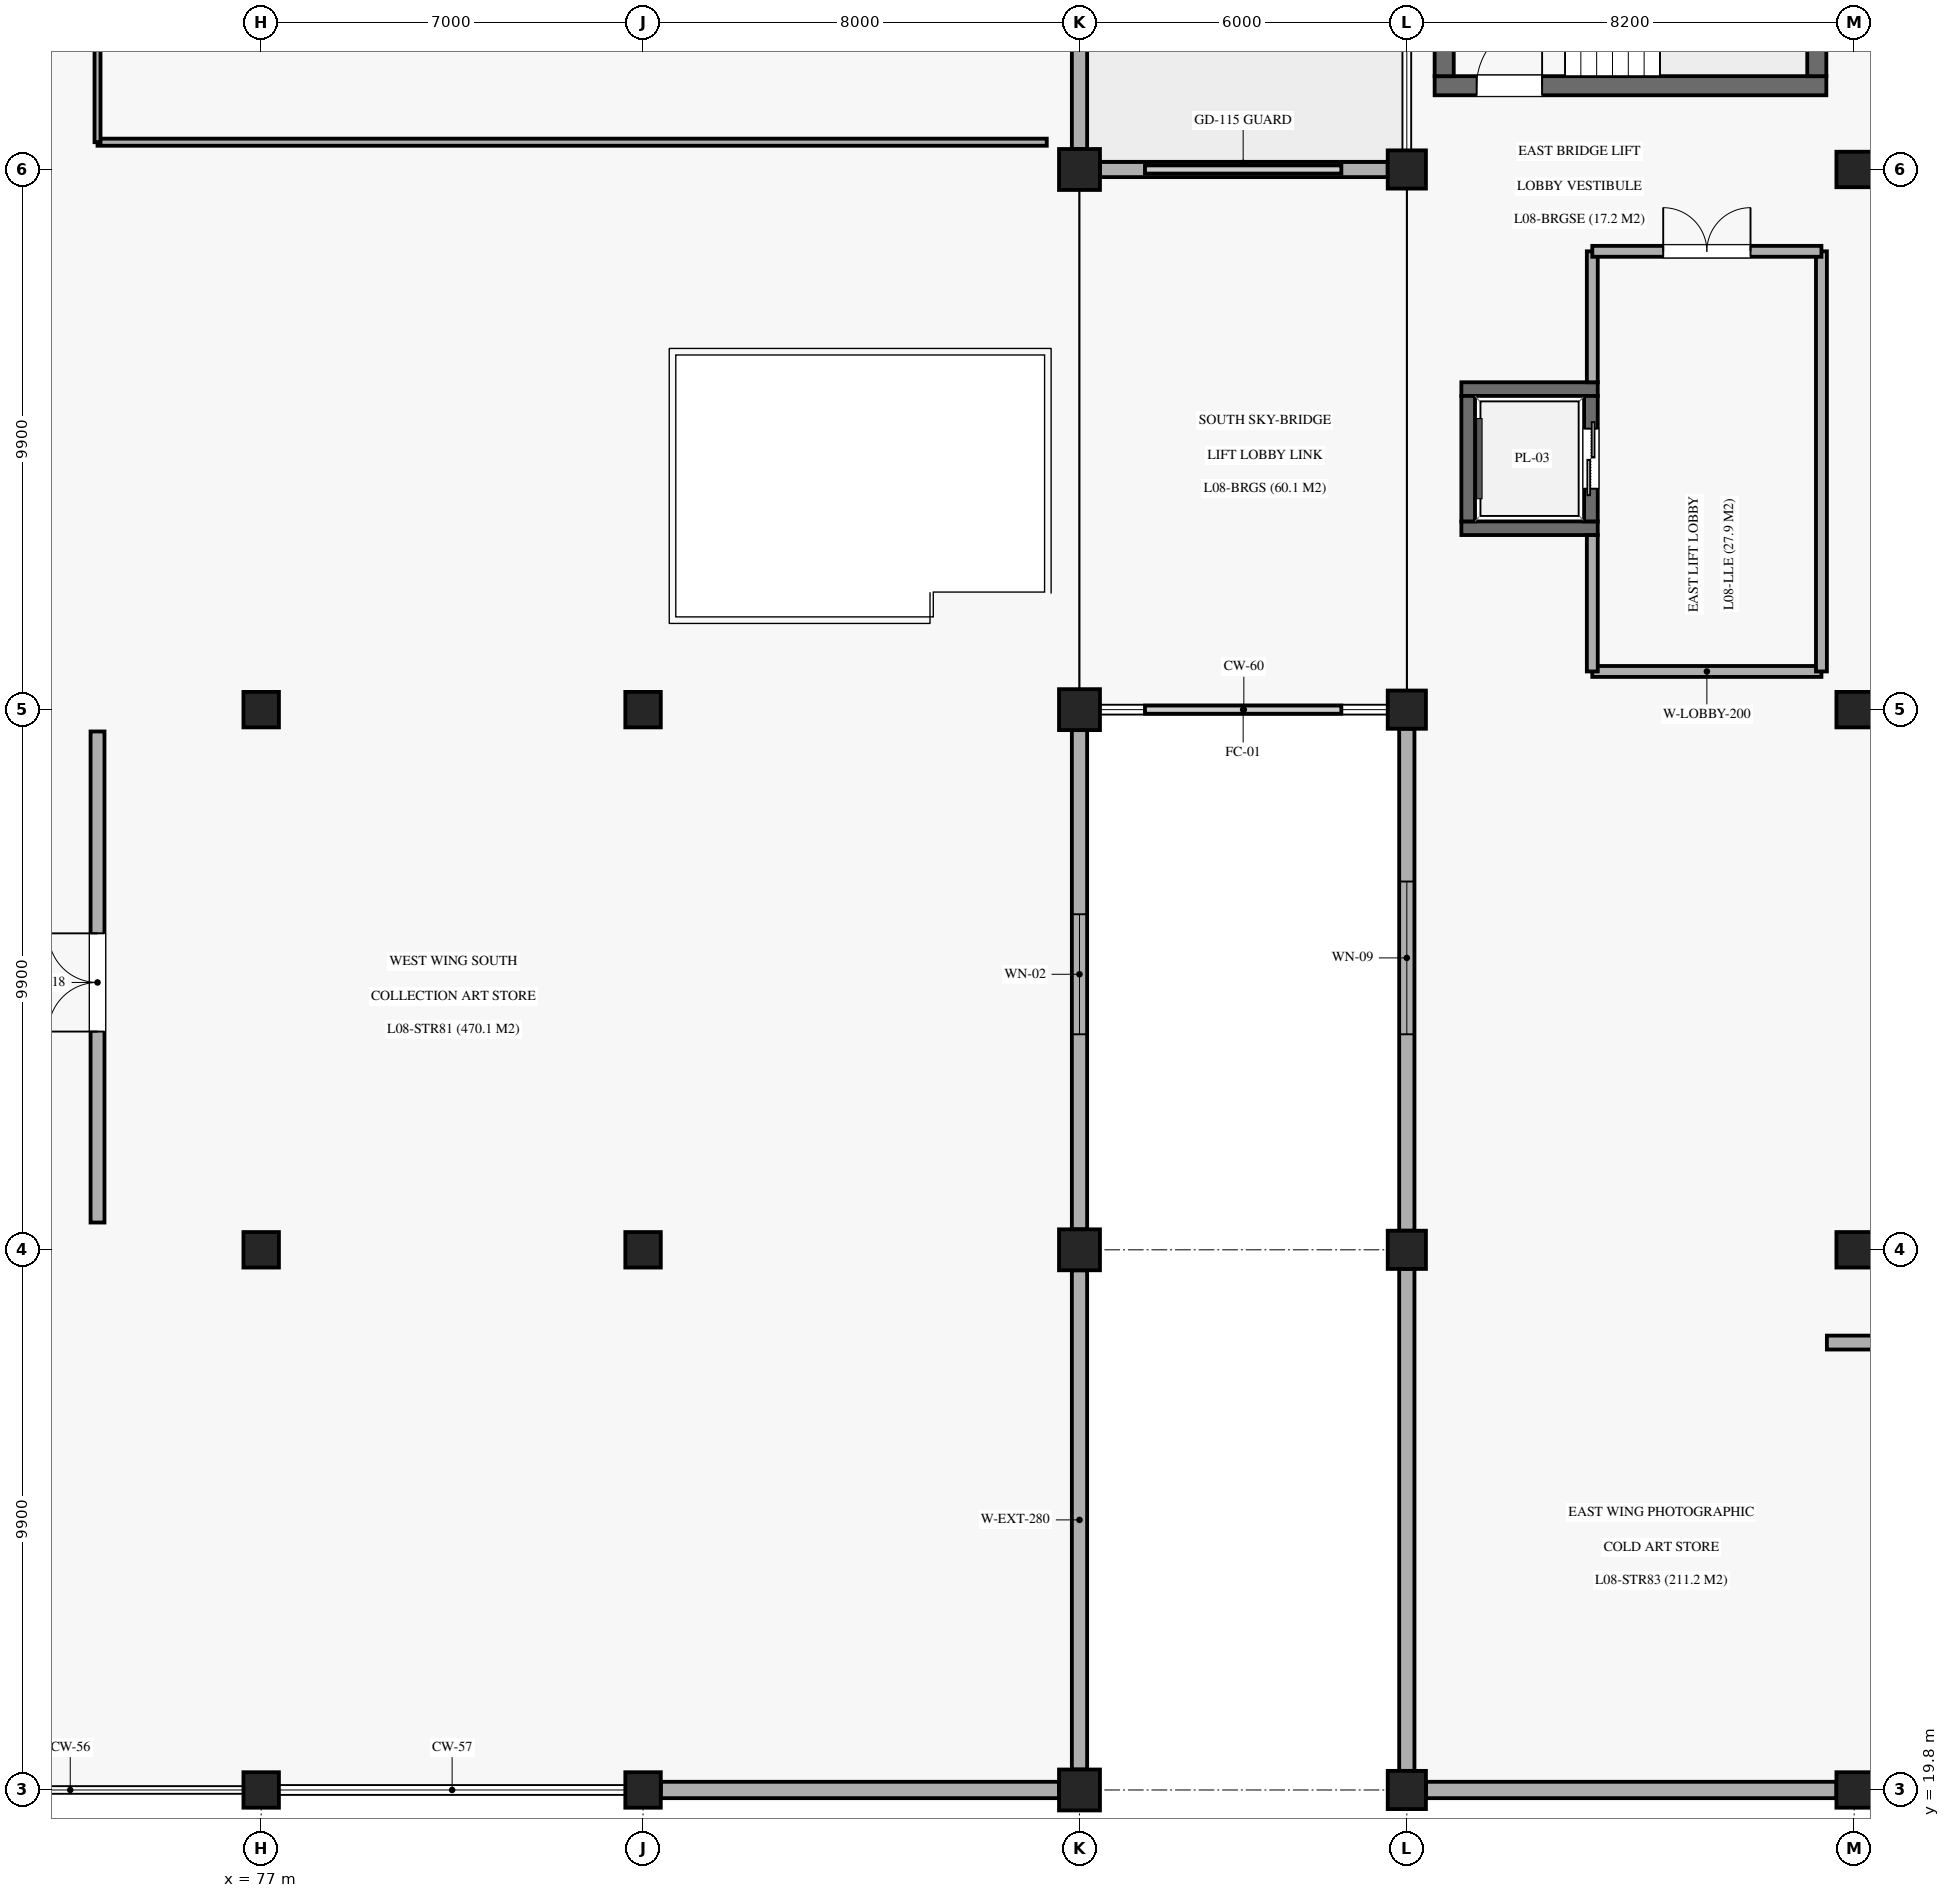
"""IFC4 building model, lengths in metres.
Left out: names, types, materials, properties, quantities, classifications, styles, units other than length and angle.
Written with IfcOpenShell. Run it as: python <this file> out.ifc"""

import sys

from ifc_helpers import new_model, si_unit, direction, frame, frame_2d, origin, origin_2d, place, context, subcontext, project, spatial, rectangle, extrude, element, fill, save


model = new_model("IFC4")
c1 = context("Model", 3, precision=1e-05, world=origin(), true_north=direction((0.0, 1.0)))
c2 = subcontext(c1, "Body", "Model", "MODEL_VIEW")
j1 = project(units=[si_unit("LENGTHUNIT", "METRE"), si_unit("PLANEANGLEUNIT", "RADIAN")], contexts=[c1])
p1 = place(None, origin())
s1 = spatial("IfcSite", under=j1, at=p1, CompositionType="ELEMENT")
p2 = place(p1, origin())
s2 = spatial("IfcBuilding", under=s1, at=p2, CompositionType="ELEMENT")
p3 = place(p2, frame((0.0, 0.0, 42.33)))
s3 = spatial("IfcBuildingStorey", under=s2, at=p3, CompositionType="ELEMENT", Elevation=42.33)
for number, where, z_axis, x_axis in (
    (1, (77.0, 19.8, 0.0), (0.0, 0.0, 1.0), (1.0, 0.0, 0.0)),
    (2, (77.0, 29.7, 0.0), (0.0, 0.0, 1.0), (1.0, 0.0, 0.0)),
    (3, (77.0, 39.6, 0.0), (0.0, 0.0, 1.0), (1.0, 0.0, 0.0)),
    (4, (84.0, 19.8, 0.0), (0.0, 0.0, 1.0), (1.0, 0.0, 0.0)),
    (5, (84.0, 29.7, 0.0), (0.0, 0.0, 1.0), (1.0, 0.0, 0.0)),
    (6, (84.0, 39.6, 0.0), (0.0, 0.0, 1.0), (1.0, 0.0, 0.0)),
):
    element("IfcColumn", number, at=place(p3, frame(where, z_axis=z_axis, x_axis=x_axis)), inside=s3, PredefinedType="COLUMN", context=c2, shape_type="SweptSolid", body=[
        extrude(rectangle(XDim=0.65, YDim=0.65, at=origin_2d()), origin(), (0.0, 0.0, 1.0), 4.59),
    ])
for number, where, z_axis, x_axis in (
    (7, (92.0, 19.8, 0.0), (0.0, 0.0, 1.0), (1.0, 0.0, 0.0)),
    (8, (92.0, 29.7, 0.0), (0.0, 0.0, 1.0), (1.0, 0.0, 0.0)),
    (9, (92.0, 39.6, 0.0), (0.0, 0.0, 1.0), (1.0, 0.0, 0.0)),
    (10, (92.0, 49.5, 0.0), (0.0, 0.0, 1.0), (1.0, 0.0, 0.0)),
):
    element("IfcColumn", number, at=place(p3, frame(where, z_axis=z_axis, x_axis=x_axis)), inside=s3, PredefinedType="COLUMN", context=c2, shape_type="SweptSolid", body=[
        extrude(rectangle(XDim=0.75, YDim=0.75, at=origin_2d()), origin(), (0.0, 0.0, 1.0), 4.59),
    ])
for number, where, z_axis, x_axis in (
    (11, (98.0, 19.8, 0.0), (0.0, 0.0, 1.0), (1.0, 0.0, 0.0)),
    (12, (98.0, 29.7, 0.0), (0.0, 0.0, 1.0), (1.0, 0.0, 0.0)),
    (13, (98.0, 39.6, 0.0), (0.0, 0.0, 1.0), (1.0, 0.0, 0.0)),
    (14, (98.0, 49.5, 0.0), (0.0, 0.0, 1.0), (1.0, 0.0, 0.0)),
):
    element("IfcColumn", number, at=place(p3, frame(where, z_axis=z_axis, x_axis=x_axis)), inside=s3, PredefinedType="COLUMN", context=c2, shape_type="SweptSolid", body=[
        extrude(rectangle(XDim=0.7, YDim=0.7, at=origin_2d()), origin(), (0.0, 0.0, 1.0), 4.59),
    ])
for number, where, z_axis, x_axis in (
    (15, (106.2, 19.8, 0.0), (0.0, 0.0, 1.0), (1.0, 0.0, 0.0)),
    (16, (106.2, 29.7, 0.0), (0.0, 0.0, 1.0), (1.0, 0.0, 0.0)),
    (17, (106.2, 39.6, 0.0), (0.0, 0.0, 1.0), (1.0, 0.0, 0.0)),
    (18, (106.2, 49.5, 0.0), (0.0, 0.0, 1.0), (1.0, 0.0, 0.0)),
):
    element("IfcColumn", number, at=place(p3, frame(where, z_axis=z_axis, x_axis=x_axis)), inside=s3, PredefinedType="COLUMN", context=c2, shape_type="SweptSolid", body=[
        extrude(rectangle(XDim=0.65, YDim=0.65, at=origin_2d()), origin(), (0.0, 0.0, 1.0), 4.59),
    ])
p4 = place(p3, frame((92.0, 20.175, 0.0), z_axis=(0.0, 0.0, 1.0), x_axis=(0.0, 1.0, 0.0)))
e19 = element("IfcWall", 19, at=p4, inside=s3, PredefinedType="SOLIDWALL", context=c2, shape_type="SweptSolid", body=[
    extrude(rectangle(XDim=9.15, YDim=0.28, at=frame_2d((4.575, 0.0))), origin(), (0.0, 0.0, 1.0), 3.59),
])
p5 = place(p3, frame((92.0, 30.075, 0.0), z_axis=(0.0, 0.0, 1.0), x_axis=(0.0, 1.0, 0.0)))
e20 = element("IfcWall", 20, at=p5, inside=s3, PredefinedType="SOLIDWALL", context=c2, shape_type="SweptSolid", body=[
    extrude(rectangle(XDim=9.15, YDim=0.28, at=frame_2d((4.575, 0.0))), origin(), (0.0, 0.0, 1.0), 3.59),
])
p6 = place(p5, frame((3.575, 0.0, 1.45)))
e21 = element("IfcOpeningElement", 21, at=p6, cuts=e20, PredefinedType="OPENING", context=c2, shape_type="SweptSolid", body=[
    extrude(rectangle(XDim=2.2, YDim=1.8, at=frame_2d((1.1, 0.9))), frame((0.0, 0.15, 0.0), z_axis=(0.0, -1.0, 0.0), x_axis=(1.0, 0.0, 0.0)), (0.0, 0.0, 1.0), 0.3),
])
p7 = place(p3, frame((92.0, 49.875, 0.0), z_axis=(0.0, 0.0, 1.0), x_axis=(0.0, 1.0, 0.0)))
e22 = element("IfcWall", 22, at=p7, inside=s3, PredefinedType="SOLIDWALL", context=c2, shape_type="SweptSolid", body=[
    extrude(rectangle(XDim=9.15, YDim=0.28, at=frame_2d((4.575, 0.0))), origin(), (0.0, 0.0, 1.0), 3.59),
])
p8 = place(p7, frame((3.775, 0.0, 0.0)))
e23 = element("IfcOpeningElement", 23, at=p8, cuts=e22, PredefinedType="OPENING", context=c2, shape_type="SweptSolid", body=[
    extrude(rectangle(XDim=1.6, YDim=2.2, at=frame_2d((0.8, 1.1))), frame((0.0, 0.15, 0.0), z_axis=(0.0, -1.0, 0.0), x_axis=(1.0, 0.0, 0.0)), (0.0, 0.0, 1.0), 0.3),
])
p9 = place(p3, frame((84.325, 19.8, 0.0), z_axis=(0.0, 0.0, 1.0), x_axis=(1.0, 0.0, 0.0)))
e24 = element("IfcWall", 24, at=p9, inside=s3, PredefinedType="SOLIDWALL", context=c2, shape_type="SweptSolid", body=[
    extrude(rectangle(XDim=7.3, YDim=0.3, at=frame_2d((3.65, 0.0))), origin(), (0.0, 0.0, 1.0), 3.59),
])
p10 = place(p3, frame((98.0, 20.15, 0.0), z_axis=(0.0, 0.0, 1.0), x_axis=(0.0, 1.0, 0.0)))
e25 = element("IfcWall", 25, at=p10, inside=s3, PredefinedType="SOLIDWALL", context=c2, shape_type="SweptSolid", body=[
    extrude(rectangle(XDim=9.2, YDim=0.28, at=frame_2d((4.6, 0.0))), origin(), (0.0, 0.0, 1.0), 3.59),
])
p11 = place(p3, frame((98.0, 30.05, 0.0), z_axis=(0.0, 0.0, 1.0), x_axis=(0.0, 1.0, 0.0)))
e26 = element("IfcWall", 26, at=p11, inside=s3, PredefinedType="SOLIDWALL", context=c2, shape_type="SweptSolid", body=[
    extrude(rectangle(XDim=9.2, YDim=0.28, at=frame_2d((4.6, 0.0))), origin(), (0.0, 0.0, 1.0), 3.59),
])
p12 = place(p11, frame((3.6, 0.0, 1.45)))
e27 = element("IfcOpeningElement", 27, at=p12, cuts=e26, PredefinedType="OPENING", context=c2, shape_type="SweptSolid", body=[
    extrude(rectangle(XDim=2.8, YDim=1.9, at=frame_2d((1.4, 0.95))), frame((0.0, 0.15, 0.0), z_axis=(0.0, -1.0, 0.0), x_axis=(1.0, 0.0, 0.0)), (0.0, 0.0, 1.0), 0.3),
])
p13 = place(p3, frame((98.35, 19.8, 0.0), z_axis=(0.0, 0.0, 1.0), x_axis=(1.0, 0.0, 0.0)))
e28 = element("IfcWall", 28, at=p13, inside=s3, PredefinedType="SOLIDWALL", context=c2, shape_type="SweptSolid", body=[
    extrude(rectangle(XDim=7.525, YDim=0.3, at=frame_2d((3.762, 0.0))), origin(), (0.0, 0.0, 1.0), 3.59),
])
p14 = place(p3, frame((92.375, 49.5, 0.0), z_axis=(0.0, 0.0, 1.0), x_axis=(1.0, 0.0, 0.0)))
e29 = element("IfcWall", 29, at=p14, inside=s3, PredefinedType="SOLIDWALL", context=c2, shape_type="SweptSolid", body=[
    extrude(rectangle(XDim=5.275, YDim=0.28, at=frame_2d((2.637, 0.0))), origin(), (0.0, 0.0, 1.0), 3.59),
])
p15 = place(p3, frame((98.51, 51.035, 0.0), z_axis=(0.0, 0.0, 1.0), x_axis=(1.0, 0.0, 0.0)))
e30 = element("IfcWall", 30, at=p15, inside=s3, PredefinedType="SHEAR", context=c2, shape_type="SweptSolid", body=[
    extrude(rectangle(XDim=7.18, YDim=0.35, at=frame_2d((3.59, 0.0))), origin(), (0.0, 0.0, 1.0), 4.34),
])
p16 = place(p15, frame((0.77, 0.0, 0.0)))
e31 = element("IfcOpeningElement", 31, at=p16, cuts=e30, PredefinedType="OPENING", context=c2, shape_type="SweptSolid", body=[
    extrude(rectangle(XDim=1.2, YDim=2.2, at=frame_2d((0.6, 1.1))), frame((0.0, 0.185, 0.0), z_axis=(0.0, -1.0, 0.0), x_axis=(1.0, 0.0, 0.0)), (0.0, 0.0, 1.0), 0.37),
])
for number, where, z_axis, x_axis in (
    (32, (98.685, 51.21, 0.0), (0.0, 0.0, 1.0), (0.0, 1.0, 0.0)),
    (33, (105.515, 51.21, 0.0), (0.0, 0.0, 1.0), (0.0, 1.0, 0.0)),
):
    element("IfcWall", number, at=place(p3, frame(where, z_axis=z_axis, x_axis=x_axis)), inside=s3, PredefinedType="SHEAR", context=c2, shape_type="SweptSolid", body=[
        extrude(rectangle(XDim=6.48, YDim=0.35, at=frame_2d((3.24, 0.0))), origin(), (0.0, 0.0, 1.0), 4.34),
    ])
for number, where, z_axis, x_axis in (
    (34, (99.0, 42.925, 0.0), (0.0, 0.0, 1.0), (1.0, 0.0, 0.0)),
    (35, (99.0, 45.475, 0.0), (0.0, 0.0, 1.0), (1.0, 0.0, 0.0)),
):
    element("IfcWall", number, at=place(p3, frame(where, z_axis=z_axis, x_axis=x_axis)), inside=s3, PredefinedType="SOLIDWALL", context=c2, shape_type="SweptSolid", body=[
        extrude(rectangle(XDim=2.5, YDim=0.25, at=frame_2d((1.25, 0.0))), origin(), (0.0, 0.0, 1.0), 4.32),
    ])
p17 = place(p3, frame((99.125, 43.05, 0.0), z_axis=(0.0, 0.0, 1.0), x_axis=(0.0, 1.0, 0.0)))
e36 = element("IfcWall", 36, at=p17, inside=s3, PredefinedType="SOLIDWALL", context=c2, shape_type="SweptSolid", body=[
    extrude(rectangle(XDim=2.3, YDim=0.25, at=frame_2d((1.15, 0.0))), origin(), (0.0, 0.0, 1.0), 4.32),
])
p18 = place(p3, frame((101.375, 43.05, 0.0), z_axis=(0.0, 0.0, 1.0), x_axis=(0.0, 1.0, 0.0)))
e37 = element("IfcWall", 37, at=p18, inside=s3, PredefinedType="SOLIDWALL", context=c2, shape_type="SweptSolid", body=[
    extrude(rectangle(XDim=2.3, YDim=0.25, at=frame_2d((1.15, 0.0))), origin(), (0.0, 0.0, 1.0), 4.32),
])
p19 = place(p18, frame((0.6, 0.0, 0.0)))
e38 = element("IfcOpeningElement", 38, at=p19, cuts=e37, PredefinedType="OPENING", context=c2, shape_type="SweptSolid", body=[
    extrude(rectangle(XDim=1.1, YDim=2.2, at=frame_2d((0.55, 1.1))), frame((0.0, 0.135, 0.0), z_axis=(0.0, -1.0, 0.0), x_axis=(1.0, 0.0, 0.0)), (0.0, 0.0, 1.0), 0.27),
])
p20 = place(p3, frame((101.4, 40.3, 0.0), z_axis=(0.0, 0.0, 1.0), x_axis=(1.0, 0.0, 0.0)))
e39 = element("IfcWall", 39, at=p20, inside=s3, PredefinedType="SOLIDWALL", context=c2, shape_type="SweptSolid", body=[
    extrude(rectangle(XDim=4.2, YDim=0.2, at=frame_2d((2.1, 0.0))), origin(), (0.0, 0.0, 1.0), 3.46),
])
p21 = place(p3, frame((101.4, 40.3, 0.0), z_axis=(0.0, 0.0, 1.0), x_axis=(0.0, 1.0, 0.0)))
e40 = element("IfcWall", 40, at=p21, inside=s3, PredefinedType="SOLIDWALL", context=c2, shape_type="SweptSolid", body=[
    extrude(rectangle(XDim=2.5, YDim=0.2, at=frame_2d((1.25, 0.0))), origin(), (0.0, 0.0, 1.0), 3.46),
])
p22 = place(p3, frame((101.4, 45.6, 0.0), z_axis=(0.0, 0.0, 1.0), x_axis=(0.0, 1.0, 0.0)))
e41 = element("IfcWall", 41, at=p22, inside=s3, PredefinedType="SOLIDWALL", context=c2, shape_type="SweptSolid", body=[
    extrude(rectangle(XDim=2.4, YDim=0.2, at=frame_2d((1.2, 0.0))), origin(), (0.0, 0.0, 1.0), 3.46),
])
p23 = place(p3, frame((105.6, 40.3, 0.0), z_axis=(0.0, 0.0, 1.0), x_axis=(0.0, 1.0, 0.0)))
e42 = element("IfcWall", 42, at=p23, inside=s3, PredefinedType="SOLIDWALL", context=c2, shape_type="SweptSolid", body=[
    extrude(rectangle(XDim=7.7, YDim=0.2, at=frame_2d((3.85, 0.0))), origin(), (0.0, 0.0, 1.0), 3.46),
])
p24 = place(p3, frame((101.4, 48.0, 0.0), z_axis=(0.0, 0.0, 1.0), x_axis=(1.0, 0.0, 0.0)))
e43 = element("IfcWall", 43, at=p24, inside=s3, PredefinedType="SOLIDWALL", context=c2, shape_type="SweptSolid", body=[
    extrude(rectangle(XDim=4.2, YDim=0.2, at=frame_2d((2.1, 0.0))), origin(), (0.0, 0.0, 1.0), 3.46),
])
p25 = place(p24, frame((1.3, 0.0, 0.0)))
e44 = element("IfcOpeningElement", 44, at=p25, cuts=e43, PredefinedType="OPENING", context=c2, shape_type="SweptSolid", body=[
    extrude(rectangle(XDim=1.6, YDim=2.2, at=frame_2d((0.8, 1.1))), frame((0.0, 0.11, 0.0), z_axis=(0.0, -1.0, 0.0), x_axis=(1.0, 0.0, 0.0)), (0.0, 0.0, 1.0), 0.22),
])
p26 = place(p3, frame((74.0, 50.0, 0.0), z_axis=(0.0, 0.0, 1.0), x_axis=(1.0, 0.0, 0.0)))
e45 = element("IfcWall", 45, at=p26, inside=s3, PredefinedType="PARTITIONING", context=c2, shape_type="SweptSolid", body=[
    extrude(rectangle(XDim=17.4, YDim=0.13, at=frame_2d((8.7, 0.0))), origin(), (0.0, 0.0, 1.0), 3.46),
])
p27 = place(p3, frame((74.0, 50.0, 0.0), z_axis=(0.0, 0.0, 1.0), x_axis=(0.0, 1.0, 0.0)))
e46 = element("IfcWall", 46, at=p27, inside=s3, PredefinedType="PARTITIONING", context=c2, shape_type="SweptSolid", body=[
    extrude(rectangle(XDim=18.8, YDim=0.11, at=frame_2d((9.4, 0.0))), origin(), (0.0, 0.0, 1.0), 3.46),
])
p28 = place(p27, frame((8.0, 0.0, 0.0)))
e47 = element("IfcOpeningElement", 47, at=p28, cuts=e46, PredefinedType="OPENING", context=c2, shape_type="SweptSolid", body=[
    extrude(rectangle(XDim=1.8, YDim=2.45, at=frame_2d((0.9, 1.225))), frame((0.0, 0.065, 0.0), z_axis=(0.0, -1.0, 0.0), x_axis=(1.0, 0.0, 0.0)), (0.0, 0.0, 1.0), 0.13),
])
p29 = place(p3, frame((74.0, 30.2, 0.0), z_axis=(0.0, 0.0, 1.0), x_axis=(0.0, 1.0, 0.0)))
e48 = element("IfcWall", 48, at=p29, inside=s3, PredefinedType="SOLIDWALL", context=c2, shape_type="SweptSolid", body=[
    extrude(rectangle(XDim=9.0, YDim=0.255, at=frame_2d((4.5, 0.0))), origin(), (0.0, 0.0, 1.0), 3.46),
])
p30 = place(p29, frame((3.5, 0.0, 0.0)))
e49 = element("IfcOpeningElement", 49, at=p30, cuts=e48, PredefinedType="OPENING", context=c2, shape_type="SweptSolid", body=[
    extrude(rectangle(XDim=1.8, YDim=2.35, at=frame_2d((0.9, 1.175))), frame((0.0, 0.137, 0.0), z_axis=(0.0, -1.0, 0.0), x_axis=(1.0, 0.0, 0.0)), (0.0, 0.0, 1.0), 0.275),
])
p31 = place(p3, frame((105.7, 28.0, 0.0), z_axis=(0.0, 0.0, 1.0), x_axis=(1.0, 0.0, 0.0)))
e50 = element("IfcWall", 50, at=p31, inside=s3, PredefinedType="SOLIDWALL", context=c2, shape_type="SweptSolid", body=[
    extrude(rectangle(XDim=7.9, YDim=0.255, at=frame_2d((3.95, 0.0))), origin(), (0.0, 0.0, 1.0), 3.46),
])
p32 = place(p31, frame((2.5, 0.0, 0.0)))
e51 = element("IfcOpeningElement", 51, at=p32, cuts=e50, PredefinedType="OPENING", context=c2, shape_type="SweptSolid", body=[
    extrude(rectangle(XDim=1.6, YDim=2.3, at=frame_2d((0.8, 1.15))), frame((0.0, 0.137, 0.0), z_axis=(0.0, -1.0, 0.0), x_axis=(1.0, 0.0, 0.0)), (0.0, 0.0, 1.0), 0.275),
])
p33 = place(p6, origin())
e52 = element("IfcWindow", 52, at=p33, inside=s3, PartitioningType="SINGLE_PANEL", PredefinedType="WINDOW", context=c2, shape_type="SweptSolid", body=[
    extrude(rectangle(XDim=2.2, YDim=1.8, at=frame_2d((1.1, 0.9))), frame((0.0, 0.03, 0.0), z_axis=(0.0, -1.0, 0.0), x_axis=(1.0, 0.0, 0.0)), (0.0, 0.0, 1.0), 0.06),
])
fill(e21, e52)
p34 = place(p12, origin())
e53 = element("IfcWindow", 53, at=p34, inside=s3, PartitioningType="SINGLE_PANEL", PredefinedType="WINDOW", context=c2, shape_type="SweptSolid", body=[
    extrude(rectangle(XDim=2.8, YDim=1.9, at=frame_2d((1.4, 0.95))), frame((0.0, 0.03, 0.0), z_axis=(0.0, -1.0, 0.0), x_axis=(1.0, 0.0, 0.0)), (0.0, 0.0, 1.0), 0.06),
])
fill(e27, e53)
p35 = place(p16, origin())
e54 = element("IfcDoor", 54, at=p35, inside=s3, OperationType="SINGLE_SWING_RIGHT", PredefinedType="DOOR", context=c2, shape_type="SweptSolid", body=[
    extrude(rectangle(XDim=1.2, YDim=2.2, at=frame_2d((0.6, 1.1))), frame((0.0, 0.025, 0.0), z_axis=(0.0, -1.0, 0.0), x_axis=(1.0, 0.0, 0.0)), (0.0, 0.0, 1.0), 0.05),
])
fill(e31, e54)
p36 = place(p19, origin())
e55 = element("IfcDoor", 55, at=p36, inside=s3, OperationType="DOUBLE_DOOR_SLIDING", PredefinedType="DOOR", context=c2, shape_type="SweptSolid", body=[
    extrude(rectangle(XDim=1.1, YDim=2.2, at=frame_2d((0.55, 1.1))), frame((0.0, 0.025, 0.0), z_axis=(0.0, -1.0, 0.0), x_axis=(1.0, 0.0, 0.0)), (0.0, 0.0, 1.0), 0.05),
])
fill(e38, e55)
p37 = place(p25, origin())
e56 = element("IfcDoor", 56, at=p37, inside=s3, OperationType="DOUBLE_DOOR_SINGLE_SWING", PredefinedType="DOOR", context=c2, shape_type="SweptSolid", body=[
    extrude(rectangle(XDim=1.6, YDim=2.2, at=frame_2d((0.8, 1.1))), frame((0.0, 0.025, 0.0), z_axis=(0.0, -1.0, 0.0), x_axis=(1.0, 0.0, 0.0)), (0.0, 0.0, 1.0), 0.05),
])
fill(e44, e56)
p38 = place(p30, origin())
e57 = element("IfcDoor", 57, at=p38, inside=s3, OperationType="DOUBLE_DOOR_SINGLE_SWING", PredefinedType="DOOR", context=c2, shape_type="SweptSolid", body=[
    extrude(rectangle(XDim=1.8, YDim=2.35, at=frame_2d((0.9, 1.175))), frame((0.0, 0.025, 0.0), z_axis=(0.0, -1.0, 0.0), x_axis=(1.0, 0.0, 0.0)), (0.0, 0.0, 1.0), 0.05),
])
fill(e49, e57)
save(model, sys.argv[1])
